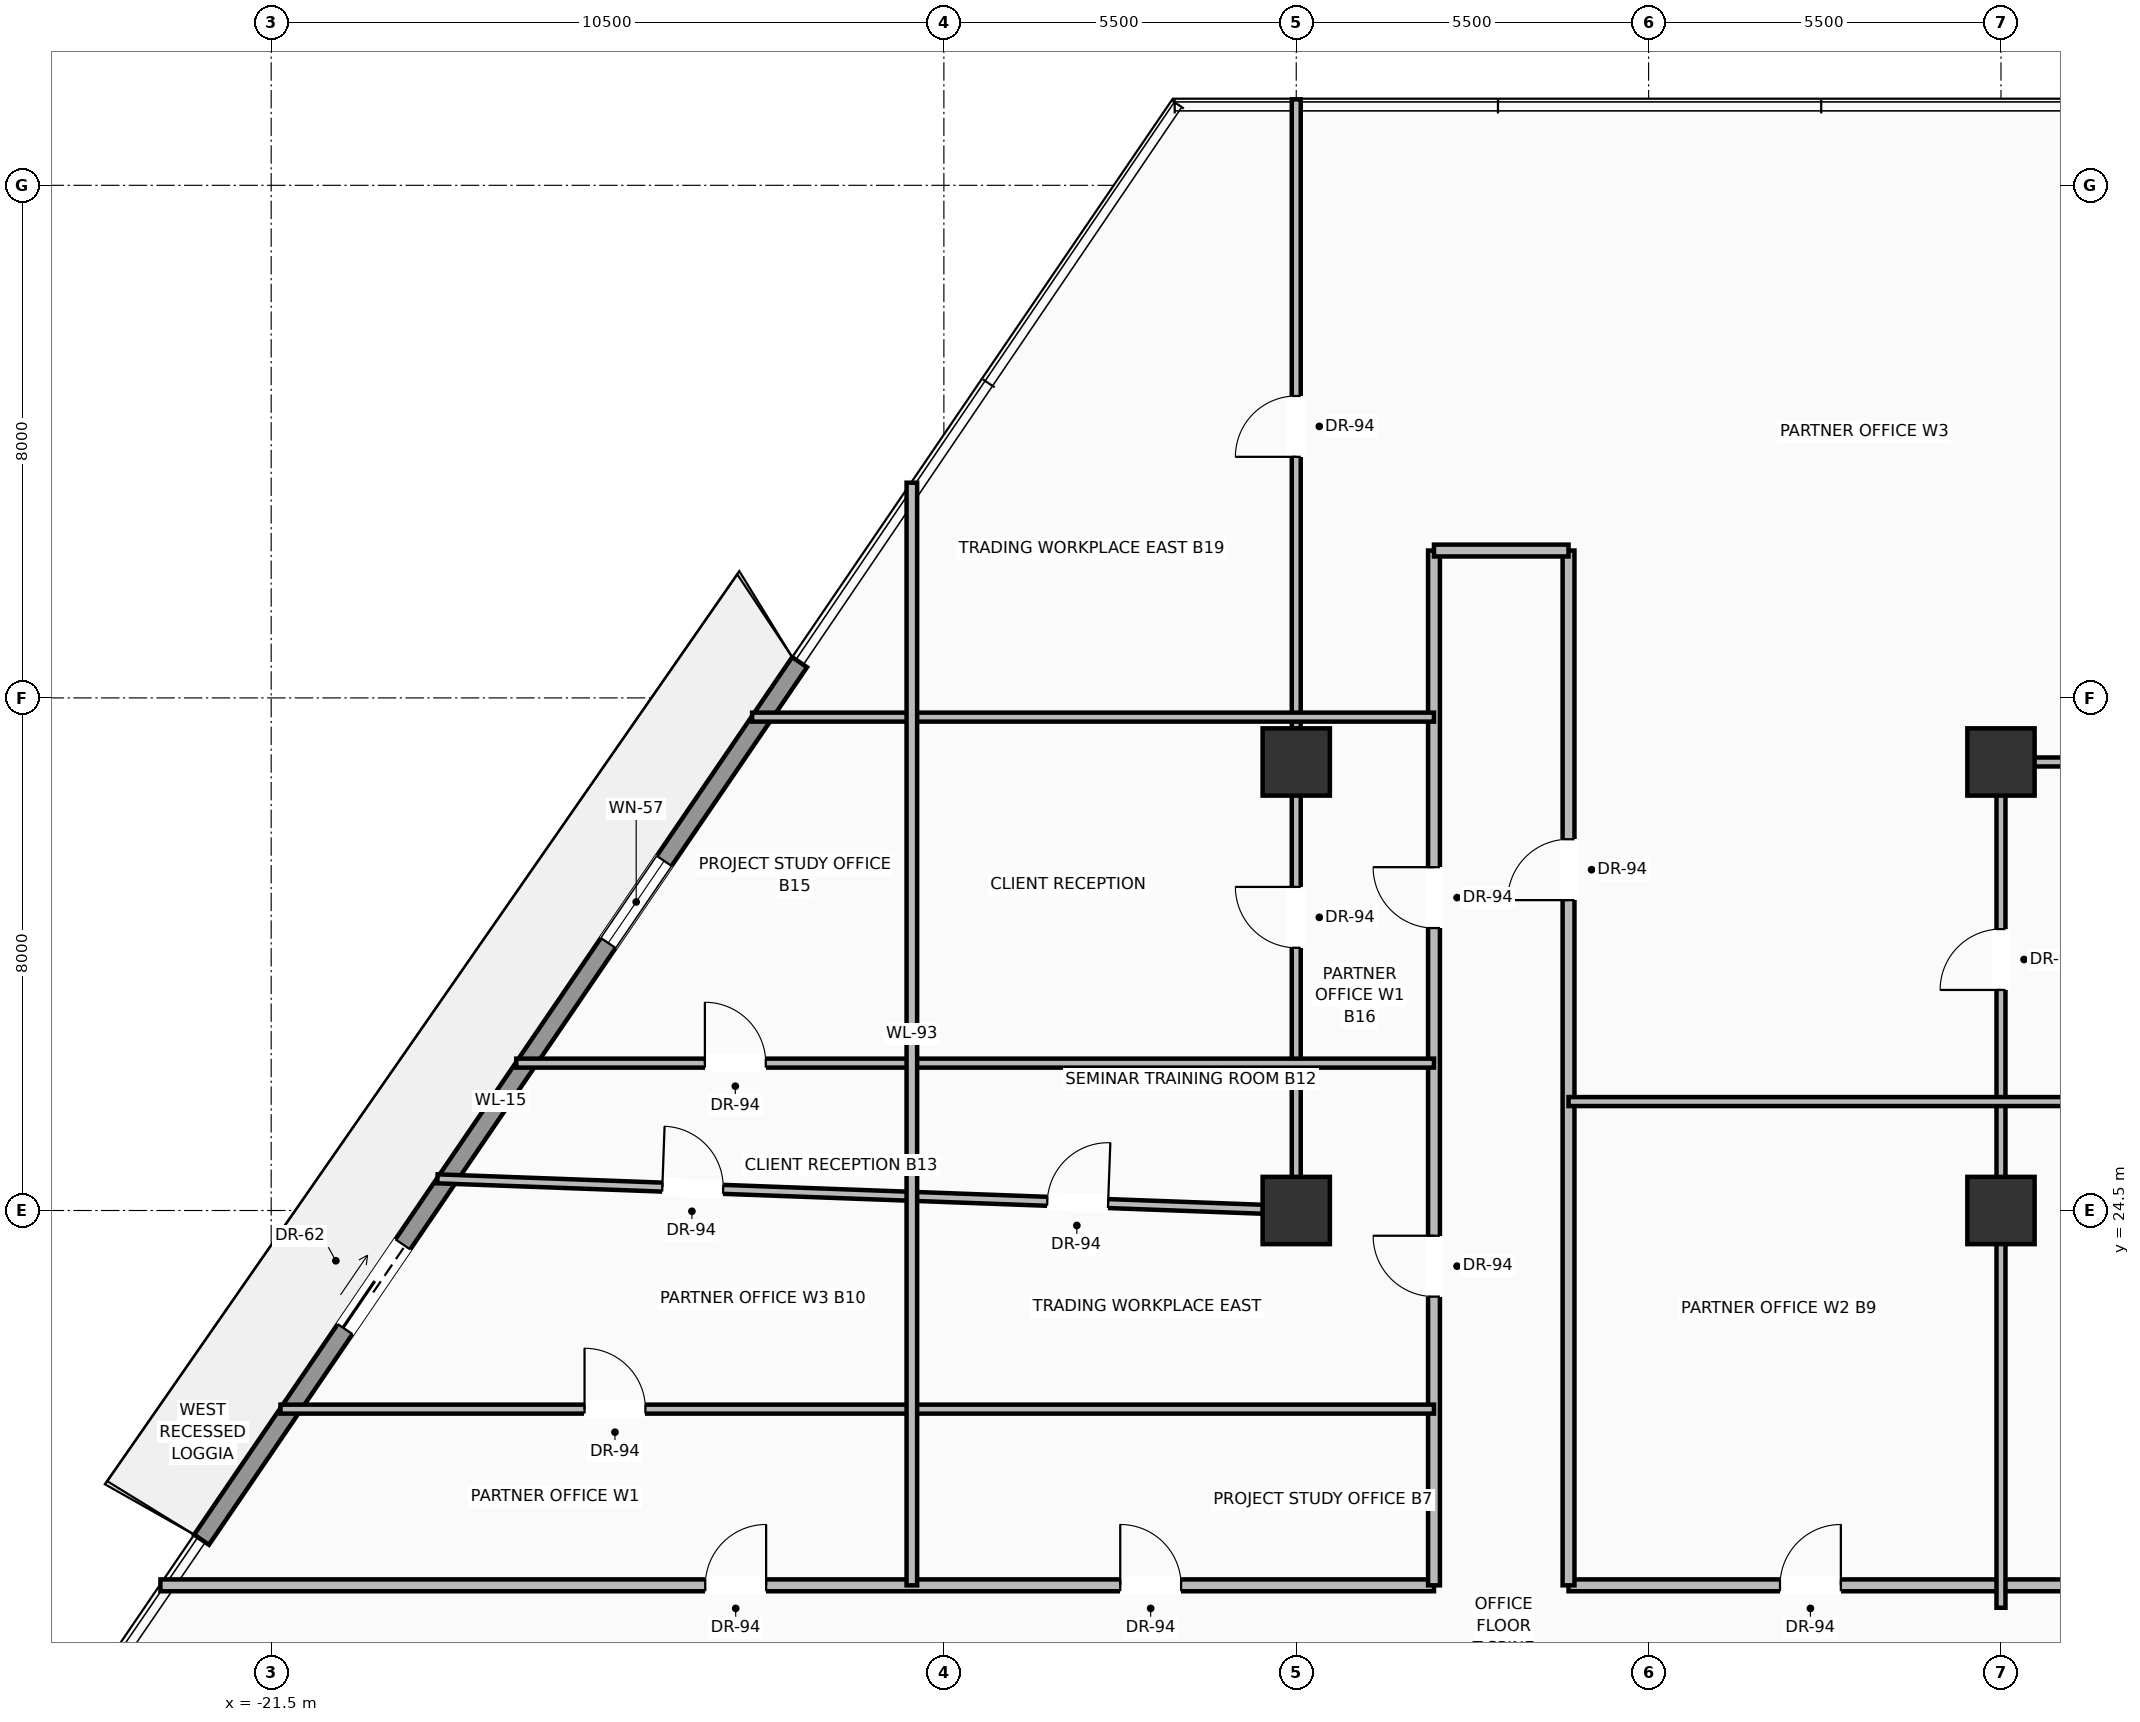
"""IFC4 building model, lengths in metres.
Left out: names, types, materials, properties, quantities, classifications, styles, units other than length and angle.
Written with IfcOpenShell. Run it as: python <this file> out.ifc"""

import sys

from ifc_helpers import new_model, si_unit, direction, frame, frame_2d, origin, origin_2d, place, context, subcontext, project, spatial, rectangle, extrude, source, transform, mapped, element, fill, save


model = new_model("IFC4")
c1 = context("Model", 3, precision=1e-05, world=origin(), true_north=direction((0.0, 1.0)))
c2 = subcontext(c1, "Body", "Model", "MODEL_VIEW")
j1 = project(units=[si_unit("LENGTHUNIT", "METRE"), si_unit("PLANEANGLEUNIT", "RADIAN")], contexts=[c1])
p1 = place(None, origin())
s1 = spatial("IfcSite", under=j1, at=p1, CompositionType="ELEMENT")
p2 = place(p1, origin())
s2 = spatial("IfcBuilding", under=s1, at=p2, CompositionType="ELEMENT")
p3 = place(p2, frame((0.0, 0.0, 42.3)))
s3 = spatial("IfcBuildingStorey", under=s2, at=p3, CompositionType="ELEMENT", Elevation=42.3)
m1 = source(origin(), c2, "Body", "SweptSolid", [
    extrude(rectangle(XDim=1.05, YDim=1.05, at=origin_2d()), origin(), (0.0, 0.0, 1.0), 3.7),
])
for number, where, z_axis, x_axis in (
    (1, (-5.5, 24.5, 0.0), (0.0, 0.0, 1.0), (1.0, 0.0, 0.0)),
    (2, (5.5, 24.5, 0.0), (0.0, 0.0, 1.0), (1.0, 0.0, 0.0)),
    (3, (-5.5, 31.5, 0.0), (0.0, 0.0, 1.0), (1.0, 0.0, 0.0)),
    (4, (5.5, 31.5, 0.0), (0.0, 0.0, 1.0), (1.0, 0.0, 0.0)),
):
    element("IfcColumn", number, at=place(p3, frame(where, z_axis=z_axis, x_axis=x_axis)), inside=s3, PredefinedType="COLUMN", context=c2, shape_type="MappedRepresentation", body=[
        mapped(m1, transform((0.0, 0.0, 0.0), scale=1.0)),
    ])
p4 = place(p3, frame((-22.587, 19.362, 0.0), z_axis=(0.0, 0.0, 1.0), x_axis=(0.563199697448, 0.826320821954, 0.0)))
e5 = element("IfcWall", 5, at=p4, inside=s3, PredefinedType="SOLIDWALL", context=c2, shape_type="SweptSolid", body=[
    extrude(rectangle(XDim=16.574, YDim=0.28, at=frame_2d((8.287, 0.0))), origin(), (0.0, 0.0, 1.0), 3.03),
])
p5 = place(p4, frame((3.978, 0.0, 0.0)))
e6 = element("IfcOpeningElement", 6, at=p5, cuts=e5, PredefinedType="OPENING", context=c2, shape_type="SweptSolid", body=[
    extrude(rectangle(XDim=1.6, YDim=2.35, at=frame_2d((0.8, 1.175))), frame((0.0, 0.15, 0.0), z_axis=(0.0, -1.0, 0.0), x_axis=(1.0, 0.0, 0.0)), (0.0, 0.0, 1.0), 0.3),
])
p6 = place(p4, frame((11.271, 0.0, 0.9)))
e7 = element("IfcOpeningElement", 7, at=p6, cuts=e5, PredefinedType="OPENING", context=c2, shape_type="SweptSolid", body=[
    extrude(rectangle(XDim=1.55, YDim=1.85, at=frame_2d((0.775, 0.925))), frame((0.0, 0.15, 0.0), z_axis=(0.0, -1.0, 0.0), x_axis=(1.0, 0.0, 0.0)), (0.0, 0.0, 1.0), 0.3),
])
p7 = place(p3, frame((-23.229, 18.65, 0.0), z_axis=(0.0, 0.0, 1.0), x_axis=(1.0, 0.0, 0.0)))
e8 = element("IfcWall", 8, at=p7, inside=s3, PredefinedType="PARTITIONING", context=c2, shape_type="SweptSolid", body=[
    extrude(rectangle(XDim=19.879, YDim=0.185, at=frame_2d((9.939, 0.0))), origin(), (0.0, 0.0, 1.0), 2.747),
])
p8 = place(p7, frame((8.505, 0.0, 0.0)))
e9 = element("IfcOpeningElement", 9, at=p8, cuts=e8, PredefinedType="OPENING", context=c2, shape_type="SweptSolid", body=[
    extrude(rectangle(XDim=0.95, YDim=2.2, at=frame_2d((0.475, 1.1))), frame((0.0, 0.103, 0.0), z_axis=(0.0, -1.0, 0.0), x_axis=(1.0, 0.0, 0.0)), (0.0, 0.0, 1.0), 0.205),
])
p9 = place(p7, frame((14.982, 0.0, 0.0)))
e10 = element("IfcOpeningElement", 10, at=p9, cuts=e8, PredefinedType="OPENING", context=c2, shape_type="SweptSolid", body=[
    extrude(rectangle(XDim=0.95, YDim=2.2, at=frame_2d((0.475, 1.1))), frame((0.0, 0.103, 0.0), z_axis=(0.0, -1.0, 0.0), x_axis=(1.0, 0.0, 0.0)), (0.0, 0.0, 1.0), 0.205),
])
p10 = place(p3, frame((-1.25, 18.65, 0.0), z_axis=(0.0, 0.0, 1.0), x_axis=(1.0, 0.0, 0.0)))
e11 = element("IfcWall", 11, at=p10, inside=s3, PredefinedType="PARTITIONING", context=c2, shape_type="SweptSolid", body=[
    extrude(rectangle(XDim=24.632, YDim=0.185, at=frame_2d((12.316, 0.0))), origin(), (0.0, 0.0, 1.0), 2.747),
])
p11 = place(p10, frame((13.038, 0.0, 0.0)))
e12 = element("IfcOpeningElement", 12, at=p11, cuts=e11, PredefinedType="OPENING", context=c2, shape_type="SweptSolid", body=[
    extrude(rectangle(XDim=0.95, YDim=2.2, at=frame_2d((0.475, 1.1))), frame((0.0, 0.103, 0.0), z_axis=(0.0, -1.0, 0.0), x_axis=(1.0, 0.0, 0.0)), (0.0, 0.0, 1.0), 0.205),
])
p12 = place(p10, frame((3.301, 0.0, 0.0)))
e13 = element("IfcOpeningElement", 13, at=p12, cuts=e11, PredefinedType="OPENING", context=c2, shape_type="SweptSolid", body=[
    extrude(rectangle(XDim=0.95, YDim=2.2, at=frame_2d((0.475, 1.1))), frame((0.0, 0.103, 0.0), z_axis=(0.0, -1.0, 0.0), x_axis=(1.0, 0.0, 0.0)), (0.0, 0.0, 1.0), 0.205),
])
p13 = place(p3, frame((-3.35, 18.65, 0.0), z_axis=(0.0, 0.0, 1.0), x_axis=(0.0, 1.0, 0.0)))
e14 = element("IfcWall", 14, at=p13, inside=s3, PredefinedType="PARTITIONING", context=c2, shape_type="SweptSolid", body=[
    extrude(rectangle(XDim=16.15, YDim=0.185, at=frame_2d((8.075, 0.0))), origin(), (0.0, 0.0, 1.0), 2.747),
])
p14 = place(p13, frame((4.506, 0.0, 0.0)))
e15 = element("IfcOpeningElement", 15, at=p14, cuts=e14, PredefinedType="OPENING", context=c2, shape_type="SweptSolid", body=[
    extrude(rectangle(XDim=0.95, YDim=2.2, at=frame_2d((0.475, 1.1))), frame((0.0, 0.103, 0.0), z_axis=(0.0, -1.0, 0.0), x_axis=(1.0, 0.0, 0.0)), (0.0, 0.0, 1.0), 0.205),
])
p15 = place(p13, frame((10.258, 0.0, 0.0)))
e16 = element("IfcOpeningElement", 16, at=p15, cuts=e14, PredefinedType="OPENING", context=c2, shape_type="SweptSolid", body=[
    extrude(rectangle(XDim=0.95, YDim=2.2, at=frame_2d((0.475, 1.1))), frame((0.0, 0.103, 0.0), z_axis=(0.0, -1.0, 0.0), x_axis=(1.0, 0.0, 0.0)), (0.0, 0.0, 1.0), 0.205),
])
p16 = place(p3, frame((-1.25, 18.65, 0.0), z_axis=(0.0, 0.0, 1.0), x_axis=(0.0, 1.0, 0.0)))
e17 = element("IfcWall", 17, at=p16, inside=s3, PredefinedType="PARTITIONING", context=c2, shape_type="SweptSolid", body=[
    extrude(rectangle(XDim=16.15, YDim=0.185, at=frame_2d((8.075, 0.0))), origin(), (0.0, 0.0, 1.0), 2.747),
])
p17 = place(p16, frame((10.694, 0.0, 0.0)))
e18 = element("IfcOpeningElement", 18, at=p17, cuts=e17, PredefinedType="OPENING", context=c2, shape_type="SweptSolid", body=[
    extrude(rectangle(XDim=0.95, YDim=2.2, at=frame_2d((0.475, 1.1))), frame((0.0, 0.103, 0.0), z_axis=(0.0, -1.0, 0.0), x_axis=(1.0, 0.0, 0.0)), (0.0, 0.0, 1.0), 0.205),
])
p18 = place(p3, frame((-3.35, 34.8, 0.0), z_axis=(0.0, 0.0, 1.0), x_axis=(1.0, 0.0, 0.0)))
e19 = element("IfcWall", 19, at=p18, inside=s3, PredefinedType="PARTITIONING", context=c2, shape_type="SweptSolid", body=[
    extrude(rectangle(XDim=2.1, YDim=0.185, at=frame_2d((1.05, 0.0))), origin(), (0.0, 0.0, 1.0), 2.979),
])
p19 = place(p3, frame((-5.5, 24.5, 0.0), z_axis=(0.0, 0.0, 1.0), x_axis=(0.0, 1.0, 0.0)))
e20 = element("IfcWall", 20, at=p19, inside=s3, PredefinedType="PARTITIONING", context=c2, shape_type="SweptSolid", body=[
    extrude(rectangle(XDim=17.342, YDim=0.14, at=frame_2d((8.671, 0.0))), origin(), (0.0, 0.0, 1.0), 2.747),
])
p20 = place(p19, frame((11.762, 0.0, 0.0)))
e21 = element("IfcOpeningElement", 21, at=p20, cuts=e20, PredefinedType="OPENING", context=c2, shape_type="SweptSolid", body=[
    extrude(rectangle(XDim=0.95, YDim=2.2, at=frame_2d((0.475, 1.1))), frame((0.0, 0.08, 0.0), z_axis=(0.0, -1.0, 0.0), x_axis=(1.0, 0.0, 0.0)), (0.0, 0.0, 1.0), 0.16),
])
p21 = place(p19, frame((4.1, 0.0, 0.0)))
e22 = element("IfcOpeningElement", 22, at=p21, cuts=e20, PredefinedType="OPENING", context=c2, shape_type="SweptSolid", body=[
    extrude(rectangle(XDim=0.95, YDim=2.2, at=frame_2d((0.475, 1.1))), frame((0.0, 0.08, 0.0), z_axis=(0.0, -1.0, 0.0), x_axis=(1.0, 0.0, 0.0)), (0.0, 0.0, 1.0), 0.16),
])
p22 = place(p3, frame((5.5, 18.3, 0.0), z_axis=(0.0, 0.0, 1.0), x_axis=(0.0, 1.0, 0.0)))
e23 = element("IfcWall", 23, at=p22, inside=s3, PredefinedType="PARTITIONING", context=c2, shape_type="SweptSolid", body=[
    extrude(rectangle(XDim=13.2, YDim=0.14, at=frame_2d((6.6, 0.0))), origin(), (0.0, 0.0, 1.0), 2.747),
])
p23 = place(p22, frame((9.642, 0.0, 0.0)))
e24 = element("IfcOpeningElement", 24, at=p23, cuts=e23, PredefinedType="OPENING", context=c2, shape_type="SweptSolid", body=[
    extrude(rectangle(XDim=0.95, YDim=2.2, at=frame_2d((0.475, 1.1))), frame((0.0, 0.08, 0.0), z_axis=(0.0, -1.0, 0.0), x_axis=(1.0, 0.0, 0.0)), (0.0, 0.0, 1.0), 0.16),
])
p24 = place(p3, frame((-18.905, 24.994, 0.0), z_axis=(0.0, 0.0, 1.0), x_axis=(0.999320581027, -0.03685615737, 0.0)))
e25 = element("IfcWall", 25, at=p24, inside=s3, PredefinedType="PARTITIONING", context=c2, shape_type="SweptSolid", body=[
    extrude(rectangle(XDim=13.414, YDim=0.14, at=frame_2d((6.707, 0.0))), origin(), (0.0, 0.0, 1.0), 2.747),
])
p25 = place(p24, frame((9.525, 0.0, 0.0)))
e26 = element("IfcOpeningElement", 26, at=p25, cuts=e25, PredefinedType="OPENING", context=c2, shape_type="SweptSolid", body=[
    extrude(rectangle(XDim=0.95, YDim=2.2, at=frame_2d((0.475, 1.1))), frame((0.0, 0.08, 0.0), z_axis=(0.0, -1.0, 0.0), x_axis=(1.0, 0.0, 0.0)), (0.0, 0.0, 1.0), 0.16),
])
p26 = place(p24, frame((3.513, 0.0, 0.0)))
e27 = element("IfcOpeningElement", 27, at=p26, cuts=e25, PredefinedType="OPENING", context=c2, shape_type="SweptSolid", body=[
    extrude(rectangle(XDim=0.95, YDim=2.2, at=frame_2d((0.475, 1.1))), frame((0.0, 0.08, 0.0), z_axis=(0.0, -1.0, 0.0), x_axis=(1.0, 0.0, 0.0)), (0.0, 0.0, 1.0), 0.16),
])
p27 = place(p3, frame((5.5, 31.5, 0.0), z_axis=(0.0, 0.0, 1.0), x_axis=(1.0, 0.0, 0.0)))
e28 = element("IfcWall", 28, at=p27, inside=s3, PredefinedType="PARTITIONING", context=c2, shape_type="SweptSolid", body=[
    extrude(rectangle(XDim=9.229, YDim=0.14, at=frame_2d((4.614, 0.0))), origin(), (0.0, 0.0, 1.0), 2.747),
])
p28 = place(p3, frame((-21.355, 21.4, 0.0), z_axis=(0.0, 0.0, 1.0), x_axis=(1.0, 0.0, 0.0)))
e29 = element("IfcWall", 29, at=p28, inside=s3, PredefinedType="PARTITIONING", context=c2, shape_type="SweptSolid", body=[
    extrude(rectangle(XDim=18.005, YDim=0.14, at=frame_2d((9.002, 0.0))), origin(), (0.0, 0.0, 1.0), 2.747),
])
p29 = place(p28, frame((4.746, 0.0, 0.0)))
e30 = element("IfcOpeningElement", 30, at=p29, cuts=e29, PredefinedType="OPENING", context=c2, shape_type="SweptSolid", body=[
    extrude(rectangle(XDim=0.95, YDim=2.2, at=frame_2d((0.475, 1.1))), frame((0.0, 0.08, 0.0), z_axis=(0.0, -1.0, 0.0), x_axis=(1.0, 0.0, 0.0)), (0.0, 0.0, 1.0), 0.16),
])
p30 = place(p3, frame((-17.674, 26.8, 0.0), z_axis=(0.0, 0.0, 1.0), x_axis=(1.0, 0.0, 0.0)))
e31 = element("IfcWall", 31, at=p30, inside=s3, PredefinedType="PARTITIONING", context=c2, shape_type="SweptSolid", body=[
    extrude(rectangle(XDim=14.324, YDim=0.14, at=frame_2d((7.162, 0.0))), origin(), (0.0, 0.0, 1.0), 2.747),
])
p31 = place(p30, frame((2.944, 0.0, 0.0)))
e32 = element("IfcOpeningElement", 32, at=p31, cuts=e31, PredefinedType="OPENING", context=c2, shape_type="SweptSolid", body=[
    extrude(rectangle(XDim=0.95, YDim=2.2, at=frame_2d((0.475, 1.1))), frame((0.0, 0.08, 0.0), z_axis=(0.0, -1.0, 0.0), x_axis=(1.0, 0.0, 0.0)), (0.0, 0.0, 1.0), 0.16),
])
p32 = place(p3, frame((-13.994, 32.2, 0.0), z_axis=(0.0, 0.0, 1.0), x_axis=(1.0, 0.0, 0.0)))
e33 = element("IfcWall", 33, at=p32, inside=s3, PredefinedType="PARTITIONING", context=c2, shape_type="SweptSolid", body=[
    extrude(rectangle(XDim=10.644, YDim=0.14, at=frame_2d((5.322, 0.0))), origin(), (0.0, 0.0, 1.0), 2.747),
])
p33 = place(p3, frame((-1.25, 26.2, 0.0), z_axis=(0.0, 0.0, 1.0), x_axis=(1.0, 0.0, 0.0)))
e34 = element("IfcWall", 34, at=p33, inside=s3, PredefinedType="PARTITIONING", context=c2, shape_type="SweptSolid", body=[
    extrude(rectangle(XDim=19.548, YDim=0.14, at=frame_2d((9.774, 0.0))), origin(), (0.0, 0.0, 1.0), 2.747),
])
p34 = place(p3, frame((-11.5, 18.65, 0.0), z_axis=(0.0, 0.0, 1.0), x_axis=(0.0, 1.0, 0.0)))
e35 = element("IfcWall", 35, at=p34, inside=s3, PredefinedType="PARTITIONING", context=c2, shape_type="SweptSolid", body=[
    extrude(rectangle(XDim=17.209, YDim=0.165, at=frame_2d((8.604, 0.0))), origin(), (0.0, 0.0, 1.0), 2.747),
])
m2 = source(origin(), c2, "Body", "SweptSolid", [
    extrude(rectangle(XDim=1.6, YDim=2.35, at=frame_2d((0.8, 1.175))), frame((0.0, 0.025, 0.0), z_axis=(0.0, -1.0, 0.0), x_axis=(1.0, 0.0, 0.0)), (0.0, 0.0, 1.0), 0.05),
])
p35 = place(p5, origin())
e36 = element("IfcDoor", 36, at=p35, inside=s3, OperationType="SLIDING_TO_LEFT", PredefinedType="DOOR", context=c2, shape_type="MappedRepresentation", body=[
    mapped(m2, transform((0.0, 0.0, 0.0), scale=1.0)),
])
fill(e6, e36)
m3 = source(origin(), c2, "Body", "SweptSolid", [
    extrude(rectangle(XDim=1.55, YDim=1.85, at=frame_2d((0.775, 0.925))), frame((0.0, 0.03, 0.0), z_axis=(0.0, -1.0, 0.0), x_axis=(1.0, 0.0, 0.0)), (0.0, 0.0, 1.0), 0.06),
])
p36 = place(p6, origin())
e37 = element("IfcWindow", 37, at=p36, inside=s3, PartitioningType="SINGLE_PANEL", PredefinedType="WINDOW", context=c2, shape_type="MappedRepresentation", body=[
    mapped(m3, transform((0.0, 0.0, 0.0), scale=1.0)),
])
fill(e7, e37)
m4 = source(origin(), c2, "Body", "SweptSolid", [
    extrude(rectangle(XDim=0.95, YDim=2.2, at=frame_2d((0.475, 1.1))), frame((0.0, 0.025, 0.0), z_axis=(0.0, -1.0, 0.0), x_axis=(1.0, 0.0, 0.0)), (0.0, 0.0, 1.0), 0.05),
])
p37 = place(p8, origin())
e38 = element("IfcDoor", 38, at=p37, inside=s3, OperationType="SINGLE_SWING_RIGHT", PredefinedType="DOOR", context=c2, shape_type="MappedRepresentation", body=[
    mapped(m4, transform((0.0, 0.0, 0.0), scale=1.0)),
])
fill(e9, e38)
p38 = place(p14, origin())
e39 = element("IfcDoor", 39, at=p38, inside=s3, OperationType="SINGLE_SWING_RIGHT", PredefinedType="DOOR", context=c2, shape_type="MappedRepresentation", body=[
    mapped(m4, transform((0.0, 0.0, 0.0), scale=1.0)),
])
fill(e15, e39)
p39 = place(p17, origin())
e40 = element("IfcDoor", 40, at=p39, inside=s3, OperationType="SINGLE_SWING_LEFT", PredefinedType="DOOR", context=c2, shape_type="MappedRepresentation", body=[
    mapped(m4, transform((0.0, 0.0, 0.0), scale=1.0)),
])
fill(e18, e40)
p40 = place(p9, origin())
e41 = element("IfcDoor", 41, at=p40, inside=s3, OperationType="SINGLE_SWING_LEFT", PredefinedType="DOOR", context=c2, shape_type="MappedRepresentation", body=[
    mapped(m4, transform((0.0, 0.0, 0.0), scale=1.0)),
])
fill(e10, e41)
p41 = place(p12, origin())
e42 = element("IfcDoor", 42, at=p41, inside=s3, OperationType="SINGLE_SWING_RIGHT", PredefinedType="DOOR", context=c2, shape_type="MappedRepresentation", body=[
    mapped(m4, transform((0.0, 0.0, 0.0), scale=1.0)),
])
fill(e13, e42)
p42 = place(p29, origin())
e43 = element("IfcDoor", 43, at=p42, inside=s3, OperationType="SINGLE_SWING_LEFT", PredefinedType="DOOR", context=c2, shape_type="MappedRepresentation", body=[
    mapped(m4, transform((0.0, 0.0, 0.0), scale=1.0)),
])
fill(e30, e43)
p43 = place(p25, origin())
e44 = element("IfcDoor", 44, at=p43, inside=s3, OperationType="SINGLE_SWING_RIGHT", PredefinedType="DOOR", context=c2, shape_type="MappedRepresentation", body=[
    mapped(m4, transform((0.0, 0.0, 0.0), scale=1.0)),
])
fill(e26, e44)
p44 = place(p23, origin())
e45 = element("IfcDoor", 45, at=p44, inside=s3, OperationType="SINGLE_SWING_LEFT", PredefinedType="DOOR", context=c2, shape_type="MappedRepresentation", body=[
    mapped(m4, transform((0.0, 0.0, 0.0), scale=1.0)),
])
fill(e24, e45)
p45 = place(p15, origin())
e46 = element("IfcDoor", 46, at=p45, inside=s3, OperationType="SINGLE_SWING_RIGHT", PredefinedType="DOOR", context=c2, shape_type="MappedRepresentation", body=[
    mapped(m4, transform((0.0, 0.0, 0.0), scale=1.0)),
])
fill(e16, e46)
p46 = place(p20, origin())
e47 = element("IfcDoor", 47, at=p46, inside=s3, OperationType="SINGLE_SWING_LEFT", PredefinedType="DOOR", context=c2, shape_type="MappedRepresentation", body=[
    mapped(m4, transform((0.0, 0.0, 0.0), scale=1.0)),
])
fill(e21, e47)
p47 = place(p26, origin())
e48 = element("IfcDoor", 48, at=p47, inside=s3, OperationType="SINGLE_SWING_LEFT", PredefinedType="DOOR", context=c2, shape_type="MappedRepresentation", body=[
    mapped(m4, transform((0.0, 0.0, 0.0), scale=1.0)),
])
fill(e27, e48)
p48 = place(p21, origin())
e49 = element("IfcDoor", 49, at=p48, inside=s3, OperationType="SINGLE_SWING_RIGHT", PredefinedType="DOOR", context=c2, shape_type="MappedRepresentation", body=[
    mapped(m4, transform((0.0, 0.0, 0.0), scale=1.0)),
])
fill(e22, e49)
p49 = place(p31, origin())
e50 = element("IfcDoor", 50, at=p49, inside=s3, OperationType="SINGLE_SWING_LEFT", PredefinedType="DOOR", context=c2, shape_type="MappedRepresentation", body=[
    mapped(m4, transform((0.0, 0.0, 0.0), scale=1.0)),
])
fill(e32, e50)
save(model, sys.argv[1])
